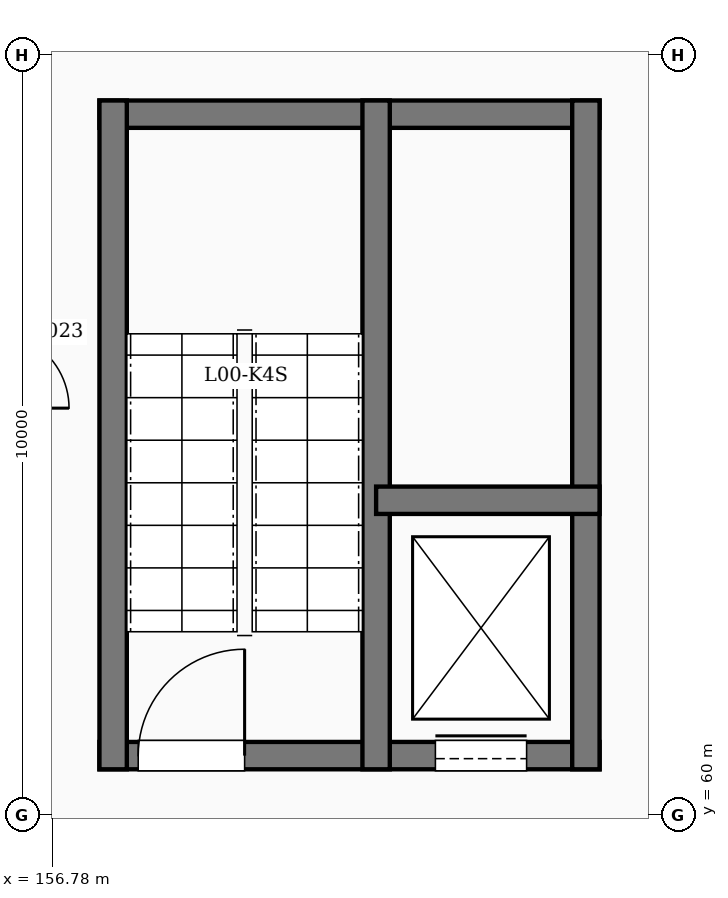
"""IFC4 building model, lengths in metres.
Left out: names, types, materials, properties, quantities, classifications, styles, units other than length and angle.
Written with IfcOpenShell. Run it as: python <this file> out.ifc"""

import sys

from ifc_helpers import new_model, si_unit, direction, frame, frame_2d, origin, place, context, subcontext, project, spatial, rectangle, extrude, element, fill, save


model = new_model("IFC4")
c1 = context("Model", 3, precision=1e-05, world=origin(), true_north=direction((0.0, 1.0)))
c2 = subcontext(c1, "Body", "Model", "MODEL_VIEW")
j1 = project(units=[si_unit("LENGTHUNIT", "METRE"), si_unit("PLANEANGLEUNIT", "RADIAN")], contexts=[c1])
p1 = place(None, origin())
s1 = spatial("IfcSite", under=j1, at=p1, CompositionType="ELEMENT")
p2 = place(p1, origin())
s2 = spatial("IfcBuilding", under=s1, at=p2, CompositionType="ELEMENT")
p3 = place(p2, origin())
s3 = spatial("IfcBuildingStorey", under=s2, at=p3, CompositionType="ELEMENT", Elevation=0.0)
p4 = place(p3, frame((157.4, 60.78, 0.0), z_axis=(0.0, 0.0, 1.0), x_axis=(1.0, 0.0, 0.0)))
e1 = element("IfcWall", 1, at=p4, inside=s3, PredefinedType="SHEAR", context=c2, shape_type="SweptSolid", body=[
    extrude(rectangle(XDim=6.58, YDim=0.36, at=frame_2d((3.29, 0.0))), origin(), (0.0, 0.0, 1.0), 5.4),
])
p5 = place(p4, frame((0.51, 0.0, 0.0)))
e2 = element("IfcOpeningElement", 2, at=p5, cuts=e1, PredefinedType="OPENING", context=c2, shape_type="SweptSolid", body=[
    extrude(rectangle(XDim=1.4, YDim=2.35, at=frame_2d((0.7, 1.175))), frame((0.0, 0.19, 0.0), z_axis=(0.0, -1.0, 0.0), x_axis=(1.0, 0.0, 0.0)), (0.0, 0.0, 1.0), 0.38),
])
p6 = place(p4, frame((4.42, 0.0, 0.0)))
e3 = element("IfcOpeningElement", 3, at=p6, cuts=e1, PredefinedType="OPENING", context=c2, shape_type="SweptSolid", body=[
    extrude(rectangle(XDim=1.2, YDim=2.35, at=frame_2d((0.6, 1.175))), frame((0.0, 0.19, 0.0), z_axis=(0.0, -1.0, 0.0), x_axis=(1.0, 0.0, 0.0)), (0.0, 0.0, 1.0), 0.38),
])
p7 = place(p3, frame((157.4, 69.22, 0.0), z_axis=(0.0, 0.0, 1.0), x_axis=(1.0, 0.0, 0.0)))
e4 = element("IfcWall", 4, at=p7, inside=s3, PredefinedType="SHEAR", context=c2, shape_type="SweptSolid", body=[
    extrude(rectangle(XDim=6.58, YDim=0.36, at=frame_2d((3.29, 0.0))), origin(), (0.0, 0.0, 1.0), 5.4),
])
for number, where, z_axis, x_axis in (
    (5, (157.58, 60.6, 0.0), (0.0, 0.0, 1.0), (0.0, 1.0, 0.0)),
    (6, (163.8, 60.6, 0.0), (0.0, 0.0, 1.0), (0.0, 1.0, 0.0)),
    (7, (161.04, 60.6, 0.0), (0.0, 0.0, 1.0), (0.0, 1.0, 0.0)),
):
    element("IfcWall", number, at=place(p3, frame(where, z_axis=z_axis, x_axis=x_axis)), inside=s3, PredefinedType="SHEAR", context=c2, shape_type="SweptSolid", body=[
        extrude(rectangle(XDim=8.8, YDim=0.36, at=frame_2d((4.4, 0.0))), origin(), (0.0, 0.0, 1.0), 5.4),
    ])
p8 = place(p3, frame((161.04, 64.14, 0.0), z_axis=(0.0, 0.0, 1.0), x_axis=(1.0, 0.0, 0.0)))
e8 = element("IfcWall", 8, at=p8, inside=s3, PredefinedType="SHEAR", context=c2, shape_type="SweptSolid", body=[
    extrude(rectangle(XDim=2.94, YDim=0.36, at=frame_2d((1.47, 0.0))), origin(), (0.0, 0.0, 1.0), 5.4),
])
p9 = place(p5, origin())
e9 = element("IfcDoor", 9, at=p9, inside=s3, OperationType="SINGLE_SWING_RIGHT", PredefinedType="DOOR", context=c2, shape_type="SweptSolid", body=[
    extrude(rectangle(XDim=1.4, YDim=2.35, at=frame_2d((0.7, 1.175))), frame((0.0, 0.025, 0.0), z_axis=(0.0, -1.0, 0.0), x_axis=(1.0, 0.0, 0.0)), (0.0, 0.0, 1.0), 0.05),
])
fill(e2, e9)
p10 = place(p6, origin())
e10 = element("IfcDoor", 10, at=p10, inside=s3, OperationType="SLIDING_TO_LEFT", PredefinedType="DOOR", context=c2, shape_type="SweptSolid", body=[
    extrude(rectangle(XDim=1.2, YDim=2.35, at=frame_2d((0.6, 1.175))), frame((0.0, 0.025, 0.0), z_axis=(0.0, -1.0, 0.0), x_axis=(1.0, 0.0, 0.0)), (0.0, 0.0, 1.0), 0.05),
])
fill(e3, e10)
save(model, sys.argv[1])
